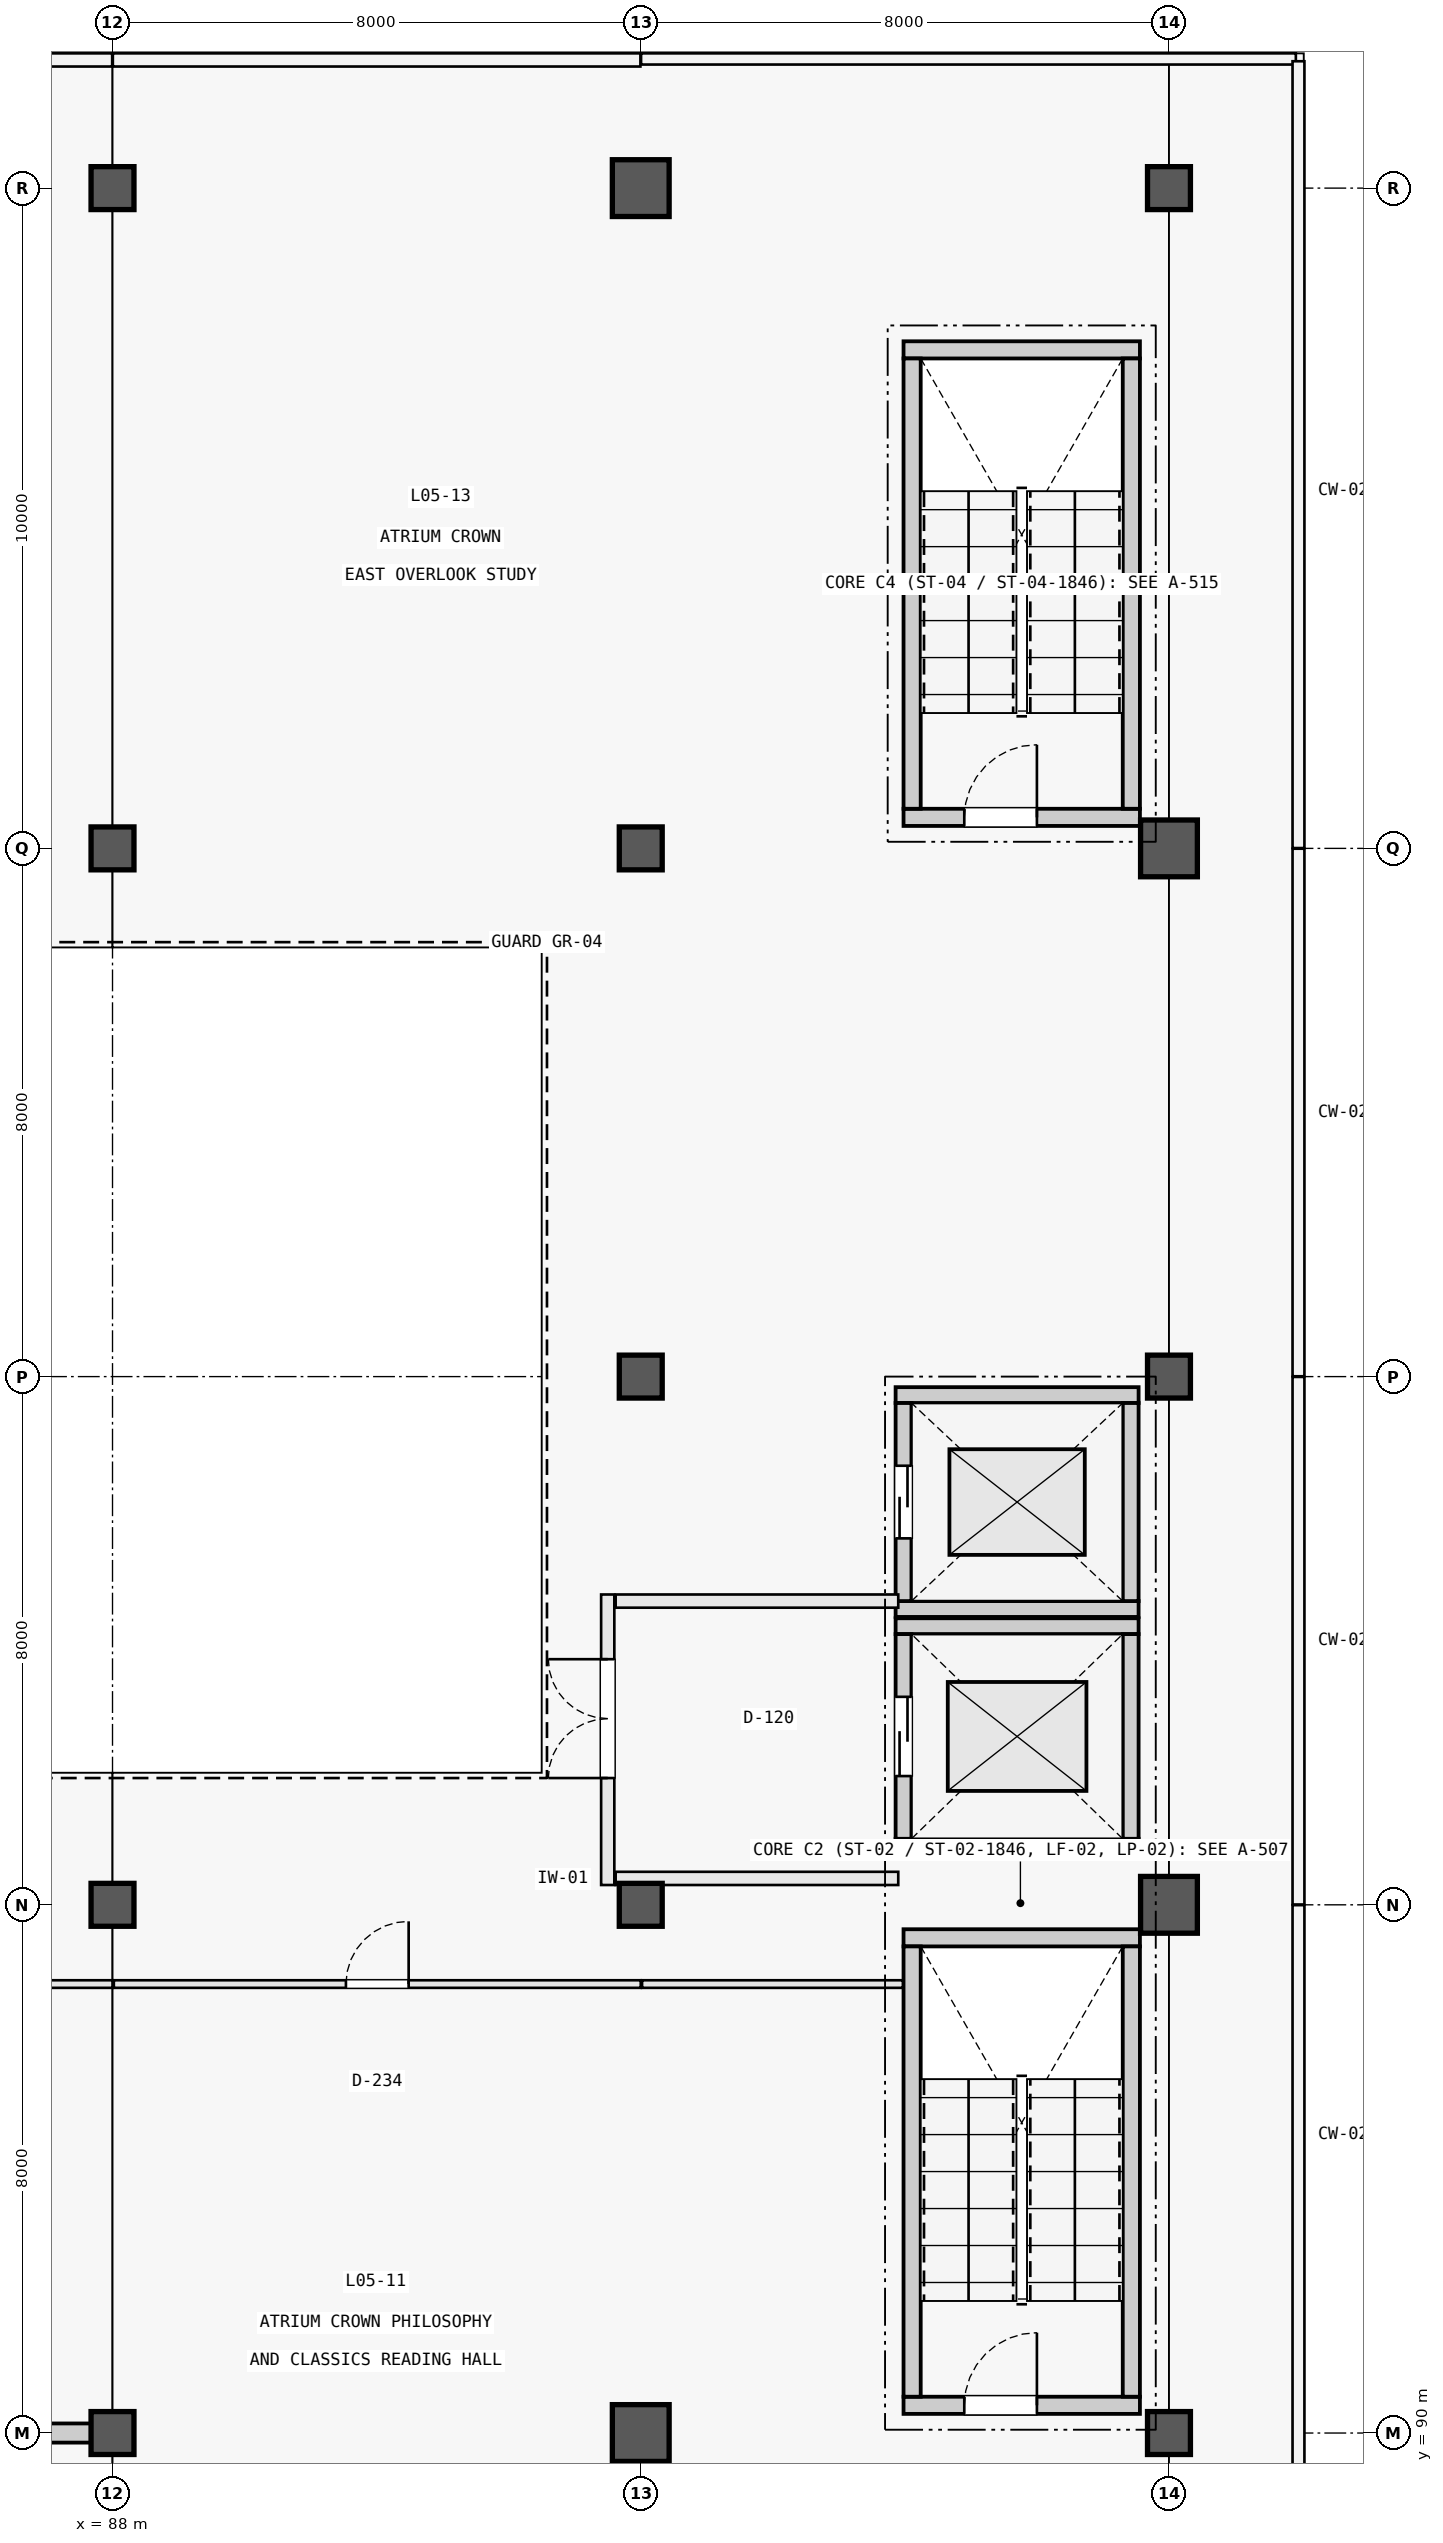
"""IFC4 building model, lengths in metres.
Left out: names, types, materials, properties, quantities, classifications, styles, units other than length and angle.
Written with IfcOpenShell. Run it as: python <this file> out.ifc"""

import sys

from ifc_helpers import new_model, si_unit, direction, frame, frame_2d, origin, origin_2d, place, context, subcontext, project, spatial, rectangle, extrude, element, fill, save


model = new_model("IFC4")
c1 = context("Model", 3, precision=1e-05, world=origin(), true_north=direction((0.0, 1.0)))
c2 = subcontext(c1, "Body", "Model", "MODEL_VIEW")
j1 = project(units=[si_unit("LENGTHUNIT", "METRE"), si_unit("PLANEANGLEUNIT", "RADIAN")], contexts=[c1])
p1 = place(None, origin())
s1 = spatial("IfcSite", under=j1, at=p1, CompositionType="ELEMENT")
p2 = place(p1, origin())
s2 = spatial("IfcBuilding", under=s1, at=p2, CompositionType="ELEMENT")
p3 = place(p2, frame((0.0, 0.0, 20.1)))
s3 = spatial("IfcBuildingStorey", under=s2, at=p3, CompositionType="ELEMENT", Elevation=20.1)
for number, where, z_axis, x_axis in (
    (1, (88.0, 90.0, 0.0), (0.0, 0.0, 1.0), (1.0, 0.0, 0.0)),
    (2, (88.0, 98.0, 0.0), (0.0, 0.0, 1.0), (1.0, 0.0, 0.0)),
    (3, (88.0, 114.0, 0.0), (0.0, 0.0, 1.0), (1.0, 0.0, 0.0)),
    (4, (88.0, 124.0, 0.0), (0.0, 0.0, 1.0), (1.0, 0.0, 0.0)),
):
    element("IfcColumn", number, at=place(p3, frame(where, z_axis=z_axis, x_axis=x_axis)), inside=s3, PredefinedType="COLUMN", context=c2, shape_type="SweptSolid", body=[
        extrude(rectangle(XDim=0.65, YDim=0.65, at=origin_2d()), origin(), (0.0, 0.0, 1.0), 4.8),
    ])
p4 = place(p3, frame((96.0, 90.0, 0.0), z_axis=(0.0, 0.0, 1.0), x_axis=(1.0, 0.0, 0.0)))
e5 = element("IfcColumn", 5, at=p4, inside=s3, PredefinedType="COLUMN", context=c2, shape_type="SweptSolid", body=[
    extrude(rectangle(XDim=0.86, YDim=0.86, at=origin_2d()), origin(), (0.0, 0.0, 1.0), 4.8),
])
for number, where, z_axis, x_axis in (
    (6, (96.0, 98.0, 0.0), (0.0, 0.0, 1.0), (1.0, 0.0, 0.0)),
    (7, (96.0, 106.0, 0.0), (0.0, 0.0, 1.0), (1.0, 0.0, 0.0)),
    (8, (96.0, 114.0, 0.0), (0.0, 0.0, 1.0), (1.0, 0.0, 0.0)),
):
    element("IfcColumn", number, at=place(p3, frame(where, z_axis=z_axis, x_axis=x_axis)), inside=s3, PredefinedType="COLUMN", context=c2, shape_type="SweptSolid", body=[
        extrude(rectangle(XDim=0.65, YDim=0.65, at=origin_2d()), origin(), (0.0, 0.0, 1.0), 4.8),
    ])
p5 = place(p3, frame((96.0, 124.0, 0.0), z_axis=(0.0, 0.0, 1.0), x_axis=(1.0, 0.0, 0.0)))
e9 = element("IfcColumn", 9, at=p5, inside=s3, PredefinedType="COLUMN", context=c2, shape_type="SweptSolid", body=[
    extrude(rectangle(XDim=0.86, YDim=0.86, at=origin_2d()), origin(), (0.0, 0.0, 1.0), 4.8),
])
p6 = place(p3, frame((104.0, 90.0, 0.0), z_axis=(0.0, 0.0, 1.0), x_axis=(1.0, 0.0, 0.0)))
e10 = element("IfcColumn", 10, at=p6, inside=s3, PredefinedType="COLUMN", context=c2, shape_type="SweptSolid", body=[
    extrude(rectangle(XDim=0.65, YDim=0.65, at=origin_2d()), origin(), (0.0, 0.0, 1.0), 4.8),
])
p7 = place(p3, frame((104.0, 98.0, 0.0), z_axis=(0.0, 0.0, 1.0), x_axis=(1.0, 0.0, 0.0)))
e11 = element("IfcColumn", 11, at=p7, inside=s3, PredefinedType="COLUMN", context=c2, shape_type="SweptSolid", body=[
    extrude(rectangle(XDim=0.86, YDim=0.86, at=origin_2d()), origin(), (0.0, 0.0, 1.0), 4.8),
])
p8 = place(p3, frame((104.0, 106.0, 0.0), z_axis=(0.0, 0.0, 1.0), x_axis=(1.0, 0.0, 0.0)))
e12 = element("IfcColumn", 12, at=p8, inside=s3, PredefinedType="COLUMN", context=c2, shape_type="SweptSolid", body=[
    extrude(rectangle(XDim=0.65, YDim=0.65, at=origin_2d()), origin(), (0.0, 0.0, 1.0), 4.8),
])
p9 = place(p3, frame((104.0, 114.0, 0.0), z_axis=(0.0, 0.0, 1.0), x_axis=(1.0, 0.0, 0.0)))
e13 = element("IfcColumn", 13, at=p9, inside=s3, PredefinedType="COLUMN", context=c2, shape_type="SweptSolid", body=[
    extrude(rectangle(XDim=0.86, YDim=0.86, at=origin_2d()), origin(), (0.0, 0.0, 1.0), 4.8),
])
p10 = place(p3, frame((104.0, 124.0, 0.0), z_axis=(0.0, 0.0, 1.0), x_axis=(1.0, 0.0, 0.0)))
e14 = element("IfcColumn", 14, at=p10, inside=s3, PredefinedType="COLUMN", context=c2, shape_type="SweptSolid", body=[
    extrude(rectangle(XDim=0.65, YDim=0.65, at=origin_2d()), origin(), (0.0, 0.0, 1.0), 4.8),
])
p11 = place(p3, frame((80.43, 90.0, 0.0), z_axis=(0.0, 0.0, 1.0), x_axis=(1.0, 0.0, 0.0)))
e15 = element("IfcWall", 15, at=p11, inside=s3, PredefinedType="SHEAR", context=c2, shape_type="SweptSolid", body=[
    extrude(rectangle(XDim=7.245, YDim=0.29, at=frame_2d((3.623, 0.0))), origin(), (0.0, 0.0, 1.0), 4.5),
])
p12 = place(p3, frame((99.98, 90.42, 0.0), z_axis=(0.0, 0.0, 1.0), x_axis=(1.0, 0.0, 0.0)))
e16 = element("IfcWall", 16, at=p12, inside=s3, PredefinedType="SOLIDWALL", context=c2, shape_type="SweptSolid", body=[
    extrude(rectangle(XDim=3.58, YDim=0.26, at=frame_2d((1.79, 0.0))), origin(), (0.0, 0.0, 1.0), 4.8),
])
p13 = place(p12, frame((0.92, 0.0, 0.0)))
e17 = element("IfcOpeningElement", 17, at=p13, cuts=e16, PredefinedType="OPENING", context=c2, shape_type="SweptSolid", body=[
    extrude(rectangle(XDim=1.1, YDim=2.2, at=frame_2d((0.55, 1.1))), frame((0.0, 0.142, 0.0), z_axis=(0.0, -1.0, 0.0), x_axis=(1.0, 0.0, 0.0)), (0.0, 0.0, 1.0), 0.284),
])
p14 = place(p3, frame((99.98, 97.5, 0.0), z_axis=(0.0, 0.0, 1.0), x_axis=(1.0, 0.0, 0.0)))
e18 = element("IfcWall", 18, at=p14, inside=s3, PredefinedType="SOLIDWALL", context=c2, shape_type="SweptSolid", body=[
    extrude(rectangle(XDim=3.58, YDim=0.26, at=frame_2d((1.79, 0.0))), origin(), (0.0, 0.0, 1.0), 4.8),
])
for number, where, z_axis, x_axis in (
    (19, (100.11, 90.55, 0.0), (0.0, 0.0, 1.0), (0.0, 1.0, 0.0)),
    (20, (103.43, 90.55, 0.0), (0.0, 0.0, 1.0), (0.0, 1.0, 0.0)),
):
    element("IfcWall", number, at=place(p3, frame(where, z_axis=z_axis, x_axis=x_axis)), inside=s3, PredefinedType="SOLIDWALL", context=c2, shape_type="SweptSolid", body=[
        extrude(rectangle(XDim=6.82, YDim=0.26, at=frame_2d((3.41, 0.0))), origin(), (0.0, 0.0, 1.0), 4.8),
    ])
p15 = place(p3, frame((99.98, 114.47, 0.0), z_axis=(0.0, 0.0, 1.0), x_axis=(1.0, 0.0, 0.0)))
e21 = element("IfcWall", 21, at=p15, inside=s3, PredefinedType="SOLIDWALL", context=c2, shape_type="SweptSolid", body=[
    extrude(rectangle(XDim=3.58, YDim=0.26, at=frame_2d((1.79, 0.0))), origin(), (0.0, 0.0, 1.0), 4.8),
])
p16 = place(p15, frame((0.92, 0.0, 0.0)))
e22 = element("IfcOpeningElement", 22, at=p16, cuts=e21, PredefinedType="OPENING", context=c2, shape_type="SweptSolid", body=[
    extrude(rectangle(XDim=1.1, YDim=2.2, at=frame_2d((0.55, 1.1))), frame((0.0, 0.142, 0.0), z_axis=(0.0, -1.0, 0.0), x_axis=(1.0, 0.0, 0.0)), (0.0, 0.0, 1.0), 0.284),
])
p17 = place(p3, frame((99.98, 121.55, 0.0), z_axis=(0.0, 0.0, 1.0), x_axis=(1.0, 0.0, 0.0)))
e23 = element("IfcWall", 23, at=p17, inside=s3, PredefinedType="SOLIDWALL", context=c2, shape_type="SweptSolid", body=[
    extrude(rectangle(XDim=3.58, YDim=0.26, at=frame_2d((1.79, 0.0))), origin(), (0.0, 0.0, 1.0), 4.8),
])
for number, where, z_axis, x_axis in (
    (24, (100.11, 114.6, 0.0), (0.0, 0.0, 1.0), (0.0, 1.0, 0.0)),
    (25, (103.43, 114.6, 0.0), (0.0, 0.0, 1.0), (0.0, 1.0, 0.0)),
):
    element("IfcWall", number, at=place(p3, frame(where, z_axis=z_axis, x_axis=x_axis)), inside=s3, PredefinedType="SOLIDWALL", context=c2, shape_type="SweptSolid", body=[
        extrude(rectangle(XDim=6.82, YDim=0.26, at=frame_2d((3.41, 0.0))), origin(), (0.0, 0.0, 1.0), 4.8),
    ])
for number, where, z_axis, x_axis in (
    (26, (99.86, 98.88, 0.0), (0.0, 0.0, 1.0), (1.0, 0.0, 0.0)),
    (27, (99.86, 102.22, 0.0), (0.0, 0.0, 1.0), (1.0, 0.0, 0.0)),
):
    element("IfcWall", number, at=place(p3, frame(where, z_axis=z_axis, x_axis=x_axis)), inside=s3, PredefinedType="SOLIDWALL", context=c2, shape_type="SweptSolid", body=[
        extrude(rectangle(XDim=3.68, YDim=0.24, at=frame_2d((1.84, 0.0))), origin(), (0.0, 0.0, 1.0), 4.8),
    ])
p18 = place(p3, frame((99.98, 99.0, 0.0), z_axis=(0.0, 0.0, 1.0), x_axis=(0.0, 1.0, 0.0)))
e28 = element("IfcWall", 28, at=p18, inside=s3, PredefinedType="SOLIDWALL", context=c2, shape_type="SweptSolid", body=[
    extrude(rectangle(XDim=3.1, YDim=0.24, at=frame_2d((1.55, 0.0))), origin(), (0.0, 0.0, 1.0), 4.8),
])
p19 = place(p18, frame((0.95, 0.0, 0.0)))
e29 = element("IfcOpeningElement", 29, at=p19, cuts=e28, PredefinedType="OPENING", context=c2, shape_type="SweptSolid", body=[
    extrude(rectangle(XDim=1.2, YDim=2.2, at=frame_2d((0.6, 1.1))), frame((0.0, 0.132, 0.0), z_axis=(0.0, -1.0, 0.0), x_axis=(1.0, 0.0, 0.0)), (0.0, 0.0, 1.0), 0.264),
])
p20 = place(p3, frame((103.42, 99.0, 0.0), z_axis=(0.0, 0.0, 1.0), x_axis=(0.0, 1.0, 0.0)))
e30 = element("IfcWall", 30, at=p20, inside=s3, PredefinedType="SOLIDWALL", context=c2, shape_type="SweptSolid", body=[
    extrude(rectangle(XDim=3.1, YDim=0.24, at=frame_2d((1.55, 0.0))), origin(), (0.0, 0.0, 1.0), 4.8),
])
for number, where, z_axis, x_axis in (
    (31, (99.86, 102.48, 0.0), (0.0, 0.0, 1.0), (1.0, 0.0, 0.0)),
    (32, (99.86, 105.72, 0.0), (0.0, 0.0, 1.0), (1.0, 0.0, 0.0)),
):
    element("IfcWall", number, at=place(p3, frame(where, z_axis=z_axis, x_axis=x_axis)), inside=s3, PredefinedType="SOLIDWALL", context=c2, shape_type="SweptSolid", body=[
        extrude(rectangle(XDim=3.68, YDim=0.24, at=frame_2d((1.84, 0.0))), origin(), (0.0, 0.0, 1.0), 4.8),
    ])
p21 = place(p3, frame((99.98, 102.6, 0.0), z_axis=(0.0, 0.0, 1.0), x_axis=(0.0, 1.0, 0.0)))
e33 = element("IfcWall", 33, at=p21, inside=s3, PredefinedType="SOLIDWALL", context=c2, shape_type="SweptSolid", body=[
    extrude(rectangle(XDim=3.0, YDim=0.24, at=frame_2d((1.5, 0.0))), origin(), (0.0, 0.0, 1.0), 4.8),
])
p22 = place(p21, frame((0.95, 0.0, 0.0)))
e34 = element("IfcOpeningElement", 34, at=p22, cuts=e33, PredefinedType="OPENING", context=c2, shape_type="SweptSolid", body=[
    extrude(rectangle(XDim=1.1, YDim=2.2, at=frame_2d((0.55, 1.1))), frame((0.0, 0.132, 0.0), z_axis=(0.0, -1.0, 0.0), x_axis=(1.0, 0.0, 0.0)), (0.0, 0.0, 1.0), 0.264),
])
p23 = place(p3, frame((103.42, 102.6, 0.0), z_axis=(0.0, 0.0, 1.0), x_axis=(0.0, 1.0, 0.0)))
e35 = element("IfcWall", 35, at=p23, inside=s3, PredefinedType="SOLIDWALL", context=c2, shape_type="SweptSolid", body=[
    extrude(rectangle(XDim=3.0, YDim=0.24, at=frame_2d((1.5, 0.0))), origin(), (0.0, 0.0, 1.0), 4.8),
])
for number, where, z_axis, x_axis in (
    (36, (95.62, 98.4, 0.0), (0.0, 0.0, 1.0), (1.0, 0.0, 0.0)),
    (37, (95.62, 102.6, 0.0), (0.0, 0.0, 1.0), (1.0, 0.0, 0.0)),
):
    element("IfcWall", number, at=place(p3, frame(where, z_axis=z_axis, x_axis=x_axis)), inside=s3, PredefinedType="PARTITIONING", context=c2, shape_type="SweptSolid", body=[
        extrude(rectangle(XDim=4.28, YDim=0.2, at=frame_2d((2.14, 0.0))), origin(), (0.0, 0.0, 1.0), 3.52),
    ])
p24 = place(p3, frame((95.5, 98.3, 0.0), z_axis=(0.0, 0.0, 1.0), x_axis=(0.0, 1.0, 0.0)))
e38 = element("IfcWall", 38, at=p24, inside=s3, PredefinedType="PARTITIONING", context=c2, shape_type="SweptSolid", body=[
    extrude(rectangle(XDim=4.4, YDim=0.2, at=frame_2d((2.2, 0.0))), origin(), (0.0, 0.0, 1.0), 3.52),
])
p25 = place(p24, frame((1.62, 0.0, 0.0)))
e39 = element("IfcOpeningElement", 39, at=p25, cuts=e38, PredefinedType="OPENING", context=c2, shape_type="SweptSolid", body=[
    extrude(rectangle(XDim=1.8, YDim=2.25, at=frame_2d((0.9, 1.125))), frame((0.0, 0.112, 0.0), z_axis=(0.0, -1.0, 0.0), x_axis=(1.0, 0.0, 0.0)), (0.0, 0.0, 1.0), 0.224),
])
p26 = place(p3, frame((80.02, 96.8, 0.0), z_axis=(0.0, 0.0, 1.0), x_axis=(1.0, 0.0, 0.0)))
e40 = element("IfcWall", 40, at=p26, inside=s3, PredefinedType="PARTITIONING", context=c2, shape_type="SweptSolid", body=[
    extrude(rectangle(XDim=7.98, YDim=0.115, at=frame_2d((3.99, 0.0))), origin(), (0.0, 0.0, 1.0), 3.35),
])
p27 = place(p26, frame((3.19, 0.0, 0.0)))
e41 = element("IfcOpeningElement", 41, at=p27, cuts=e40, PredefinedType="OPENING", context=c2, shape_type="SweptSolid", body=[
    extrude(rectangle(XDim=1.6, YDim=2.2, at=frame_2d((0.8, 1.1))), frame((0.0, 0.069, 0.0), z_axis=(0.0, -1.0, 0.0), x_axis=(1.0, 0.0, 0.0)), (0.0, 0.0, 1.0), 0.139),
])
p28 = place(p3, frame((88.02, 96.8, 0.0), z_axis=(0.0, 0.0, 1.0), x_axis=(1.0, 0.0, 0.0)))
e42 = element("IfcWall", 42, at=p28, inside=s3, PredefinedType="PARTITIONING", context=c2, shape_type="SweptSolid", body=[
    extrude(rectangle(XDim=7.98, YDim=0.115, at=frame_2d((3.99, 0.0))), origin(), (0.0, 0.0, 1.0), 3.35),
])
p29 = place(p28, frame((3.515, 0.0, 0.0)))
e43 = element("IfcOpeningElement", 43, at=p29, cuts=e42, PredefinedType="OPENING", context=c2, shape_type="SweptSolid", body=[
    extrude(rectangle(XDim=0.95, YDim=2.15, at=frame_2d((0.475, 1.075))), frame((0.0, 0.069, 0.0), z_axis=(0.0, -1.0, 0.0), x_axis=(1.0, 0.0, 0.0)), (0.0, 0.0, 1.0), 0.139),
])
p30 = place(p3, frame((96.02, 96.8, 0.0), z_axis=(0.0, 0.0, 1.0), x_axis=(1.0, 0.0, 0.0)))
e44 = element("IfcWall", 44, at=p30, inside=s3, PredefinedType="PARTITIONING", context=c2, shape_type="SweptSolid", body=[
    extrude(rectangle(XDim=3.95, YDim=0.115, at=frame_2d((1.975, 0.0))), origin(), (0.0, 0.0, 1.0), 3.35),
])
p31 = place(p13, origin())
e45 = element("IfcDoor", 45, at=p31, inside=s3, OperationType="SINGLE_SWING_RIGHT", PredefinedType="DOOR", context=c2, shape_type="SweptSolid", body=[
    extrude(rectangle(XDim=1.1, YDim=2.2, at=frame_2d((0.55, 1.1))), frame((0.0, 0.025, 0.0), z_axis=(0.0, -1.0, 0.0), x_axis=(1.0, 0.0, 0.0)), (0.0, 0.0, 1.0), 0.05),
])
fill(e17, e45)
p32 = place(p16, origin())
e46 = element("IfcDoor", 46, at=p32, inside=s3, OperationType="SINGLE_SWING_RIGHT", PredefinedType="DOOR", context=c2, shape_type="SweptSolid", body=[
    extrude(rectangle(XDim=1.1, YDim=2.2, at=frame_2d((0.55, 1.1))), frame((0.0, 0.025, 0.0), z_axis=(0.0, -1.0, 0.0), x_axis=(1.0, 0.0, 0.0)), (0.0, 0.0, 1.0), 0.05),
])
fill(e22, e46)
p33 = place(p19, origin())
e47 = element("IfcDoor", 47, at=p33, inside=s3, OperationType="DOUBLE_DOOR_SLIDING", PredefinedType="DOOR", context=c2, shape_type="SweptSolid", body=[
    extrude(rectangle(XDim=1.2, YDim=2.2, at=frame_2d((0.6, 1.1))), frame((0.0, 0.025, 0.0), z_axis=(0.0, -1.0, 0.0), x_axis=(1.0, 0.0, 0.0)), (0.0, 0.0, 1.0), 0.05),
])
fill(e29, e47)
p34 = place(p22, origin())
e48 = element("IfcDoor", 48, at=p34, inside=s3, OperationType="DOUBLE_DOOR_SLIDING", PredefinedType="DOOR", context=c2, shape_type="SweptSolid", body=[
    extrude(rectangle(XDim=1.1, YDim=2.2, at=frame_2d((0.55, 1.1))), frame((0.0, 0.025, 0.0), z_axis=(0.0, -1.0, 0.0), x_axis=(1.0, 0.0, 0.0)), (0.0, 0.0, 1.0), 0.05),
])
fill(e34, e48)
p35 = place(p25, origin())
e49 = element("IfcDoor", 49, at=p35, inside=s3, OperationType="DOUBLE_DOOR_SINGLE_SWING", PredefinedType="DOOR", context=c2, shape_type="SweptSolid", body=[
    extrude(rectangle(XDim=1.8, YDim=2.25, at=frame_2d((0.9, 1.125))), frame((0.0, 0.025, 0.0), z_axis=(0.0, -1.0, 0.0), x_axis=(1.0, 0.0, 0.0)), (0.0, 0.0, 1.0), 0.05),
])
fill(e39, e49)
p36 = place(p29, origin())
e50 = element("IfcDoor", 50, at=p36, inside=s3, OperationType="SINGLE_SWING_RIGHT", PredefinedType="DOOR", context=c2, shape_type="SweptSolid", body=[
    extrude(rectangle(XDim=0.95, YDim=2.15, at=frame_2d((0.475, 1.075))), frame((0.0, 0.025, 0.0), z_axis=(0.0, -1.0, 0.0), x_axis=(1.0, 0.0, 0.0)), (0.0, 0.0, 1.0), 0.05),
])
fill(e43, e50)
save(model, sys.argv[1])
